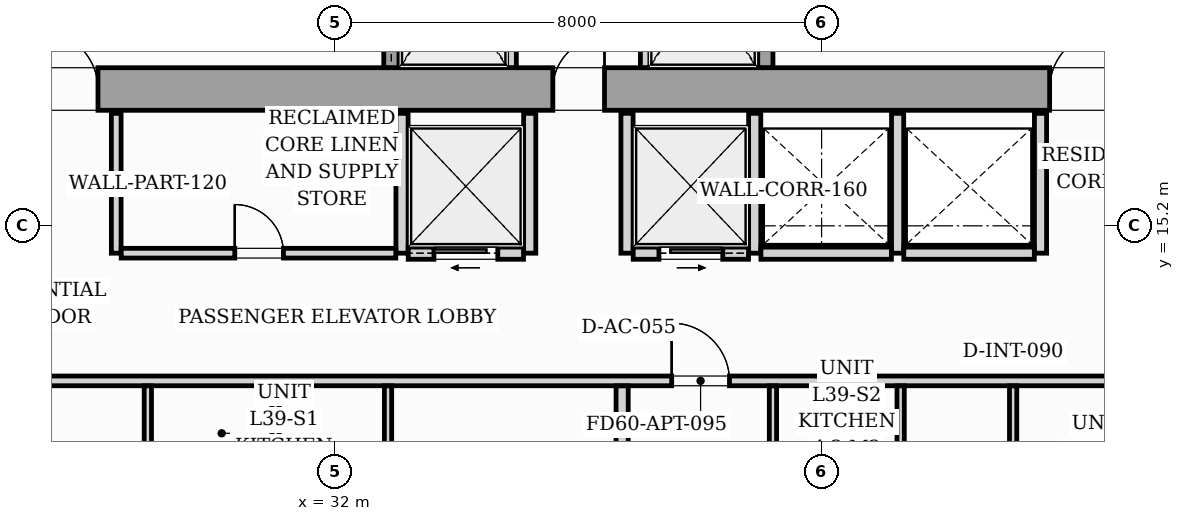
"""IFC4 building model, lengths in metres.
Left out: names, types, materials, properties, quantities, classifications, styles, units other than length and angle.
Written with IfcOpenShell. Run it as: python <this file> out.ifc"""

import sys

from ifc_helpers import new_model, si_unit, direction, frame, frame_2d, origin, origin_2d, place, context, subcontext, project, spatial, rectangle, i_section, extrude, source, transform, mapped, element, fill, save


model = new_model("IFC4")
c1 = context("Model", 3, precision=1e-05, world=origin(), true_north=direction((0.0, 1.0)))
c2 = subcontext(c1, "Body", "Model", "MODEL_VIEW")
j1 = project(units=[si_unit("LENGTHUNIT", "METRE"), si_unit("PLANEANGLEUNIT", "RADIAN")], contexts=[c1])
p1 = place(None, origin())
s1 = spatial("IfcSite", under=j1, at=p1, CompositionType="ELEMENT")
p2 = place(p1, origin())
s2 = spatial("IfcBuilding", under=s1, at=p2, CompositionType="ELEMENT")
p3 = place(p2, frame((0.0, 0.0, 137.4)))
s3 = spatial("IfcBuildingStorey", under=s2, at=p3, CompositionType="ELEMENT", Elevation=137.4)
m1 = source(origin(), c2, "Body", "SweptSolid", [
    extrude(i_section(OverallWidth=0.421, OverallDepth=0.465, WebThickness=0.045, FlangeThickness=0.073, FilletRadius=0.018, at=origin_2d()), origin(), (0.0, 0.0, 1.0), 3.196),
])
for number, where, z_axis, x_axis in (
    (1, (33.12, 17.4, 0.002), (0.0, 0.0, 1.0), (1.0, 0.0, 0.0)),
    (2, (38.88, 17.4, 0.002), (0.0, 0.0, 1.0), (1.0, 0.0, 0.0)),
):
    element("IfcColumn", number, at=place(p3, frame(where, z_axis=z_axis, x_axis=x_axis)), inside=s3, PredefinedType="PILASTER", context=c2, shape_type="MappedRepresentation", body=[
        mapped(m1, transform((0.0, 0.0, 0.0), scale=1.0)),
    ])
p4 = place(p3, frame((26.1, 17.45, 0.0), z_axis=(0.0, 0.0, 1.0), x_axis=(1.0, 0.0, 0.0)))
e3 = element("IfcWall", 3, at=p4, inside=s3, PredefinedType="SHEAR", context=c2, shape_type="SweptSolid", body=[
    extrude(rectangle(XDim=19.8, YDim=0.7, at=frame_2d((9.9, 0.0))), origin(), (0.0, 0.0, 1.0), 3.2),
])
p5 = place(p4, frame((1.05, 0.0, 0.0)))
e4 = element("IfcOpeningElement", 4, at=p5, cuts=e3, PredefinedType="OPENING", context=c2, shape_type="SweptSolid", body=[
    extrude(rectangle(XDim=0.95, YDim=2.06, at=frame_2d((0.475, 1.03))), frame((0.0, 0.36, 0.0), z_axis=(0.0, -1.0, 0.0), x_axis=(1.0, 0.0, 0.0)), (0.0, 0.0, 1.0), 0.72),
])
p6 = place(p4, frame((9.48, 0.0, 0.0)))
e5 = element("IfcOpeningElement", 5, at=p6, cuts=e3, PredefinedType="OPENING", context=c2, shape_type="SweptSolid", body=[
    extrude(rectangle(XDim=0.85, YDim=2.0, at=frame_2d((0.425, 1.0))), frame((0.0, 0.36, 0.0), z_axis=(0.0, -1.0, 0.0), x_axis=(1.0, 0.0, 0.0)), (0.0, 0.0, 1.0), 0.72),
])
p7 = place(p4, frame((17.65, 0.0, 0.0)))
e6 = element("IfcOpeningElement", 6, at=p7, cuts=e3, PredefinedType="OPENING", context=c2, shape_type="SweptSolid", body=[
    extrude(rectangle(XDim=0.95, YDim=2.06, at=frame_2d((0.475, 1.03))), frame((0.0, 0.36, 0.0), z_axis=(0.0, -1.0, 0.0), x_axis=(1.0, 0.0, 0.0)), (0.0, 0.0, 1.0), 0.72),
])
p8 = place(p3, frame((32.925, 17.802, 0.0), z_axis=(0.0, 0.0, 1.0), x_axis=(0.0, 1.0, 0.0)))
e7 = element("IfcWall", 7, at=p8, inside=s3, PredefinedType="SOLIDWALL", context=c2, shape_type="SweptSolid", body=[
    extrude(rectangle(XDim=2.646, YDim=0.25, at=frame_2d((1.323, 0.0))), origin(), (0.0, 0.0, 1.0), 3.2),
])
p9 = place(p8, frame((0.598, 0.0, 0.0)))
e8 = element("IfcOpeningElement", 8, at=p9, cuts=e7, PredefinedType="OPENING", context=c2, shape_type="SweptSolid", body=[
    extrude(rectangle(XDim=1.1, YDim=2.08, at=frame_2d((0.55, 1.04))), frame((0.0, 0.135, 0.0), z_axis=(0.0, -1.0, 0.0), x_axis=(1.0, 0.0, 0.0)), (0.0, 0.0, 1.0), 0.27),
])
for number, where, z_axis, x_axis in (
    (9, (34.9, 17.802, 0.0), (0.0, 0.0, 1.0), (0.0, 1.0, 0.0)),
    (10, (37.1, 17.802, 0.0), (0.0, 0.0, 1.0), (0.0, 1.0, 0.0)),
):
    element("IfcWall", number, at=place(p3, frame(where, z_axis=z_axis, x_axis=x_axis)), inside=s3, PredefinedType="PARTITIONING", context=c2, shape_type="SweptSolid", body=[
        extrude(rectangle(XDim=2.646, YDim=0.16, at=frame_2d((1.323, 0.0))), origin(), (0.0, 0.0, 1.0), 2.94),
    ])
p10 = place(p3, frame((39.075, 17.802, 0.0), z_axis=(0.0, 0.0, 1.0), x_axis=(0.0, 1.0, 0.0)))
e11 = element("IfcWall", 11, at=p10, inside=s3, PredefinedType="SOLIDWALL", context=c2, shape_type="SweptSolid", body=[
    extrude(rectangle(XDim=2.646, YDim=0.25, at=frame_2d((1.323, 0.0))), origin(), (0.0, 0.0, 1.0), 3.2),
])
p11 = place(p10, frame((0.598, 0.0, 0.0)))
e12 = element("IfcOpeningElement", 12, at=p11, cuts=e11, PredefinedType="OPENING", context=c2, shape_type="SweptSolid", body=[
    extrude(rectangle(XDim=1.1, YDim=2.08, at=frame_2d((0.55, 1.04))), frame((0.0, 0.135, 0.0), z_axis=(0.0, -1.0, 0.0), x_axis=(1.0, 0.0, 0.0)), (0.0, 0.0, 1.0), 0.27),
])
p12 = place(p3, frame((28.4, 14.75, 0.0), z_axis=(0.0, 0.0, 1.0), x_axis=(0.0, 1.0, 0.0)))
e13 = element("IfcWall", 13, at=p12, inside=s3, PredefinedType="PARTITIONING", context=c2, shape_type="SweptSolid", body=[
    extrude(rectangle(XDim=2.3, YDim=0.16, at=frame_2d((1.15, 0.0))), origin(), (0.0, 0.0, 1.0), 2.94),
])
p13 = place(p3, frame((33.1, 14.75, 0.0), z_axis=(0.0, 0.0, 1.0), x_axis=(0.0, 1.0, 0.0)))
e14 = element("IfcWall", 14, at=p13, inside=s3, PredefinedType="PARTITIONING", context=c2, shape_type="SweptSolid", body=[
    extrude(rectangle(XDim=2.3, YDim=0.2, at=frame_2d((1.15, 0.0))), origin(), (0.0, 0.0, 1.0), 2.94),
])
p14 = place(p3, frame((28.482, 14.75, 0.0), z_axis=(0.0, 0.0, 1.0), x_axis=(1.0, 0.0, 0.0)))
e15 = element("IfcWall", 15, at=p14, inside=s3, PredefinedType="PARTITIONING", context=c2, shape_type="SweptSolid", body=[
    extrude(rectangle(XDim=4.516, YDim=0.16, at=frame_2d((2.258, 0.0))), origin(), (0.0, 0.0, 1.0), 2.94),
])
p15 = place(p14, frame((1.868, 0.0, 0.0)))
e16 = element("IfcOpeningElement", 16, at=p15, cuts=e15, PredefinedType="OPENING", context=c2, shape_type="SweptSolid", body=[
    extrude(rectangle(XDim=0.8, YDim=2.05, at=frame_2d((0.4, 1.025))), frame((0.0, 0.09, 0.0), z_axis=(0.0, -1.0, 0.0), x_axis=(1.0, 0.0, 0.0)), (0.0, 0.0, 1.0), 0.18),
])
p16 = place(p3, frame((35.2, 14.75, 0.0), z_axis=(0.0, 0.0, 1.0), x_axis=(0.0, 1.0, 0.0)))
e17 = element("IfcWall", 17, at=p16, inside=s3, PredefinedType="PARTITIONING", context=c2, shape_type="SweptSolid", body=[
    extrude(rectangle(XDim=2.3, YDim=0.2, at=frame_2d((1.15, 0.0))), origin(), (0.0, 0.0, 1.0), 2.94),
])
p17 = place(p3, frame((33.202, 14.75, 0.0), z_axis=(0.0, 0.0, 1.0), x_axis=(1.0, 0.0, 0.0)))
e18 = element("IfcWall", 18, at=p17, inside=s3, PredefinedType="PARTITIONING", context=c2, shape_type="SweptSolid", body=[
    extrude(rectangle(XDim=1.896, YDim=0.2, at=frame_2d((0.948, 0.0))), origin(), (0.0, 0.0, 1.0), 2.94),
])
p18 = place(p17, frame((0.423, 0.0, 0.0)))
e19 = element("IfcOpeningElement", 19, at=p18, cuts=e18, PredefinedType="OPENING", context=c2, shape_type="SweptSolid", body=[
    extrude(rectangle(XDim=1.05, YDim=2.08, at=frame_2d((0.525, 1.04))), frame((0.0, 0.11, 0.0), z_axis=(0.0, -1.0, 0.0), x_axis=(1.0, 0.0, 0.0)), (0.0, 0.0, 1.0), 0.22),
])
for number, where, z_axis, x_axis in (
    (20, (36.8, 14.75, 0.0), (0.0, 0.0, 1.0), (0.0, 1.0, 0.0)),
    (21, (38.9, 14.75, 0.0), (0.0, 0.0, 1.0), (0.0, 1.0, 0.0)),
):
    element("IfcWall", number, at=place(p3, frame(where, z_axis=z_axis, x_axis=x_axis)), inside=s3, PredefinedType="PARTITIONING", context=c2, shape_type="SweptSolid", body=[
        extrude(rectangle(XDim=2.3, YDim=0.2, at=frame_2d((1.15, 0.0))), origin(), (0.0, 0.0, 1.0), 2.94),
    ])
p19 = place(p3, frame((36.902, 14.75, 0.0), z_axis=(0.0, 0.0, 1.0), x_axis=(1.0, 0.0, 0.0)))
e22 = element("IfcWall", 22, at=p19, inside=s3, PredefinedType="PARTITIONING", context=c2, shape_type="SweptSolid", body=[
    extrude(rectangle(XDim=1.896, YDim=0.2, at=frame_2d((0.948, 0.0))), origin(), (0.0, 0.0, 1.0), 2.94),
])
p20 = place(p19, frame((0.423, 0.0, 0.0)))
e23 = element("IfcOpeningElement", 23, at=p20, cuts=e22, PredefinedType="OPENING", context=c2, shape_type="SweptSolid", body=[
    extrude(rectangle(XDim=1.05, YDim=2.08, at=frame_2d((0.525, 1.04))), frame((0.0, 0.11, 0.0), z_axis=(0.0, -1.0, 0.0), x_axis=(1.0, 0.0, 0.0)), (0.0, 0.0, 1.0), 0.22),
])
for number, where, z_axis, x_axis in (
    (24, (41.25, 14.75, 0.0), (0.0, 0.0, 1.0), (0.0, 1.0, 0.0)),
    (25, (43.6, 14.75, 0.0), (0.0, 0.0, 1.0), (0.0, 1.0, 0.0)),
):
    element("IfcWall", number, at=place(p3, frame(where, z_axis=z_axis, x_axis=x_axis)), inside=s3, PredefinedType="PARTITIONING", context=c2, shape_type="SweptSolid", body=[
        extrude(rectangle(XDim=2.3, YDim=0.2, at=frame_2d((1.15, 0.0))), origin(), (0.0, 0.0, 1.0), 2.94),
    ])
for number, where, z_axis, x_axis in (
    (26, (39.002, 14.75, 0.0), (0.0, 0.0, 1.0), (1.0, 0.0, 0.0)),
    (27, (41.352, 14.75, 0.0), (0.0, 0.0, 1.0), (1.0, 0.0, 0.0)),
):
    element("IfcWall", number, at=place(p3, frame(where, z_axis=z_axis, x_axis=x_axis)), inside=s3, PredefinedType="PARTITIONING", context=c2, shape_type="SweptSolid", body=[
        extrude(rectangle(XDim=2.146, YDim=0.2, at=frame_2d((1.073, 0.0))), origin(), (0.0, 0.0, 1.0), 2.94),
    ])
p21 = place(p3, frame((22.05, 12.65, 0.0), z_axis=(0.0, 0.0, 1.0), x_axis=(1.0, 0.0, 0.0)))
e28 = element("IfcWall", 28, at=p21, inside=s3, PredefinedType="PARTITIONING", context=c2, shape_type="SweptSolid", body=[
    extrude(rectangle(XDim=23.83, YDim=0.16, at=frame_2d((11.915, 0.0))), origin(), (0.0, 0.0, 1.0), 2.94),
])
p22 = place(p21, frame((3.0, 0.0, 0.0)))
e29 = element("IfcOpeningElement", 29, at=p22, cuts=e28, PredefinedType="OPENING", context=c2, shape_type="SweptSolid", body=[
    extrude(rectangle(XDim=0.95, YDim=2.06, at=frame_2d((0.475, 1.03))), frame((0.0, 0.09, 0.0), z_axis=(0.0, -1.0, 0.0), x_axis=(1.0, 0.0, 0.0)), (0.0, 0.0, 1.0), 0.18),
])
p23 = place(p21, frame((15.485, 0.0, 0.0)))
e30 = element("IfcOpeningElement", 30, at=p23, cuts=e28, PredefinedType="OPENING", context=c2, shape_type="SweptSolid", body=[
    extrude(rectangle(XDim=0.95, YDim=2.06, at=frame_2d((0.475, 1.03))), frame((0.0, 0.09, 0.0), z_axis=(0.0, -1.0, 0.0), x_axis=(1.0, 0.0, 0.0)), (0.0, 0.0, 1.0), 0.18),
])
p24 = place(p3, frame((32.87, 7.028, 0.0), z_axis=(0.0, 0.0, 1.0), x_axis=(0.0, 1.0, 0.0)))
e31 = element("IfcWall", 31, at=p24, inside=s3, PredefinedType="PARTITIONING", context=c2, shape_type="SweptSolid", body=[
    extrude(rectangle(XDim=5.54, YDim=0.12, at=frame_2d((2.77, 0.0))), origin(), (0.0, 0.0, 1.0), 2.94),
])
p25 = place(p24, frame((2.272, 0.0, 0.0)))
e32 = element("IfcOpeningElement", 32, at=p25, cuts=e31, PredefinedType="OPENING", context=c2, shape_type="SweptSolid", body=[
    extrude(rectangle(XDim=0.9, YDim=2.05, at=frame_2d((0.45, 1.025))), frame((0.0, 0.07, 0.0), z_axis=(0.0, -1.0, 0.0), x_axis=(1.0, 0.0, 0.0)), (0.0, 0.0, 1.0), 0.14),
])
for number, where, z_axis, x_axis in (
    (33, (31.02, 10.462, 0.0), (0.0, 0.0, 1.0), (0.0, 1.0, 0.0)),
    (34, (28.92, 10.462, 0.0), (0.0, 0.0, 1.0), (0.0, 1.0, 0.0)),
):
    element("IfcWall", number, at=place(p3, frame(where, z_axis=z_axis, x_axis=x_axis)), inside=s3, PredefinedType="PARTITIONING", context=c2, shape_type="SweptSolid", body=[
        extrude(rectangle(XDim=2.106, YDim=0.12, at=frame_2d((1.053, 0.0))), origin(), (0.0, 0.0, 1.0), 2.94),
    ])
p26 = place(p3, frame((36.72, 6.658, 0.0), z_axis=(0.0, 0.0, 1.0), x_axis=(0.0, 1.0, 0.0)))
e35 = element("IfcWall", 35, at=p26, inside=s3, PredefinedType="PARTITIONING", context=c2, shape_type="SweptSolid", body=[
    extrude(rectangle(XDim=5.91, YDim=0.2, at=frame_2d((2.955, 0.0))), origin(), (0.0, 0.0, 1.0), 2.94),
])
p27 = place(p3, frame((43.15, 6.221, 0.0), z_axis=(0.0, 0.0, 1.0), x_axis=(0.0, 1.0, 0.0)))
e36 = element("IfcWall", 36, at=p27, inside=s3, PredefinedType="PARTITIONING", context=c2, shape_type="SweptSolid", body=[
    extrude(rectangle(XDim=6.347, YDim=0.12, at=frame_2d((3.173, 0.0))), origin(), (0.0, 0.0, 1.0), 2.94),
])
p28 = place(p27, frame((3.079, 0.0, 0.0)))
e37 = element("IfcOpeningElement", 37, at=p28, cuts=e36, PredefinedType="OPENING", context=c2, shape_type="SweptSolid", body=[
    extrude(rectangle(XDim=0.9, YDim=2.05, at=frame_2d((0.45, 1.025))), frame((0.0, 0.07, 0.0), z_axis=(0.0, -1.0, 0.0), x_axis=(1.0, 0.0, 0.0)), (0.0, 0.0, 1.0), 0.14),
])
for number, where, z_axis, x_axis in (
    (38, (41.3, 10.462, 0.0), (0.0, 0.0, 1.0), (0.0, 1.0, 0.0)),
    (39, (39.2, 10.462, 0.0), (0.0, 0.0, 1.0), (0.0, 1.0, 0.0)),
):
    element("IfcWall", number, at=place(p3, frame(where, z_axis=z_axis, x_axis=x_axis)), inside=s3, PredefinedType="PARTITIONING", context=c2, shape_type="SweptSolid", body=[
        extrude(rectangle(XDim=2.106, YDim=0.12, at=frame_2d((1.053, 0.0))), origin(), (0.0, 0.0, 1.0), 2.94),
    ])
m2 = source(origin(), c2, "Body", "SweptSolid", [
    extrude(rectangle(XDim=0.95, YDim=2.06, at=frame_2d((0.475, 1.03))), frame((0.0, 0.025, 0.0), z_axis=(0.0, -1.0, 0.0), x_axis=(1.0, 0.0, 0.0)), (0.0, 0.0, 1.0), 0.05),
])
p29 = place(p5, origin())
e40 = element("IfcDoor", 40, at=p29, inside=s3, OperationType="SINGLE_SWING_LEFT", PredefinedType="DOOR", context=c2, shape_type="MappedRepresentation", body=[
    mapped(m2, transform((0.0, 0.0, 0.0), scale=1.0)),
])
fill(e4, e40)
m3 = source(origin(), c2, "Body", "SweptSolid", [
    extrude(rectangle(XDim=0.85, YDim=2.0, at=frame_2d((0.425, 1.0))), frame((0.0, 0.025, 0.0), z_axis=(0.0, -1.0, 0.0), x_axis=(1.0, 0.0, 0.0)), (0.0, 0.0, 1.0), 0.05),
])
p30 = place(p6, origin())
e41 = element("IfcDoor", 41, at=p30, inside=s3, OperationType="SINGLE_SWING_RIGHT", PredefinedType="DOOR", context=c2, shape_type="MappedRepresentation", body=[
    mapped(m3, transform((0.0, 0.0, 0.0), scale=1.0)),
])
fill(e5, e41)
p31 = place(p7, origin())
e42 = element("IfcDoor", 42, at=p31, inside=s3, OperationType="SINGLE_SWING_RIGHT", PredefinedType="DOOR", context=c2, shape_type="MappedRepresentation", body=[
    mapped(m2, transform((0.0, 0.0, 0.0), scale=1.0)),
])
fill(e6, e42)
m4 = source(origin(), c2, "Body", "SweptSolid", [
    extrude(rectangle(XDim=0.8, YDim=2.05, at=frame_2d((0.4, 1.025))), frame((0.0, 0.025, 0.0), z_axis=(0.0, -1.0, 0.0), x_axis=(1.0, 0.0, 0.0)), (0.0, 0.0, 1.0), 0.05),
])
p32 = place(p15, origin())
e43 = element("IfcDoor", 43, at=p32, inside=s3, OperationType="SINGLE_SWING_LEFT", PredefinedType="DOOR", context=c2, shape_type="MappedRepresentation", body=[
    mapped(m4, transform((0.0, 0.0, 0.0), scale=1.0)),
])
fill(e16, e43)
m5 = source(origin(), c2, "Body", "SweptSolid", [
    extrude(rectangle(XDim=1.05, YDim=2.08, at=frame_2d((0.525, 1.04))), frame((0.0, 0.025, 0.0), z_axis=(0.0, -1.0, 0.0), x_axis=(1.0, 0.0, 0.0)), (0.0, 0.0, 1.0), 0.05),
])
p33 = place(p18, origin())
e44 = element("IfcDoor", 44, at=p33, inside=s3, OperationType="SLIDING_TO_LEFT", PredefinedType="DOOR", context=c2, shape_type="MappedRepresentation", body=[
    mapped(m5, transform((0.0, 0.0, 0.0), scale=1.0)),
])
fill(e19, e44)
p34 = place(p20, origin())
e45 = element("IfcDoor", 45, at=p34, inside=s3, OperationType="SLIDING_TO_RIGHT", PredefinedType="DOOR", context=c2, shape_type="MappedRepresentation", body=[
    mapped(m5, transform((0.0, 0.0, 0.0), scale=1.0)),
])
fill(e23, e45)
m6 = source(origin(), c2, "Body", "SweptSolid", [
    extrude(rectangle(XDim=0.95, YDim=2.06, at=frame_2d((0.475, 1.03))), frame((0.0, 0.025, 0.0), z_axis=(0.0, -1.0, 0.0), x_axis=(1.0, 0.0, 0.0)), (0.0, 0.0, 1.0), 0.05),
])
p35 = place(p23, origin())
e46 = element("IfcDoor", 46, at=p35, inside=s3, OperationType="SINGLE_SWING_LEFT", PredefinedType="DOOR", context=c2, shape_type="MappedRepresentation", body=[
    mapped(m6, transform((0.0, 0.0, 0.0), scale=1.0)),
])
fill(e30, e46)
save(model, sys.argv[1])
